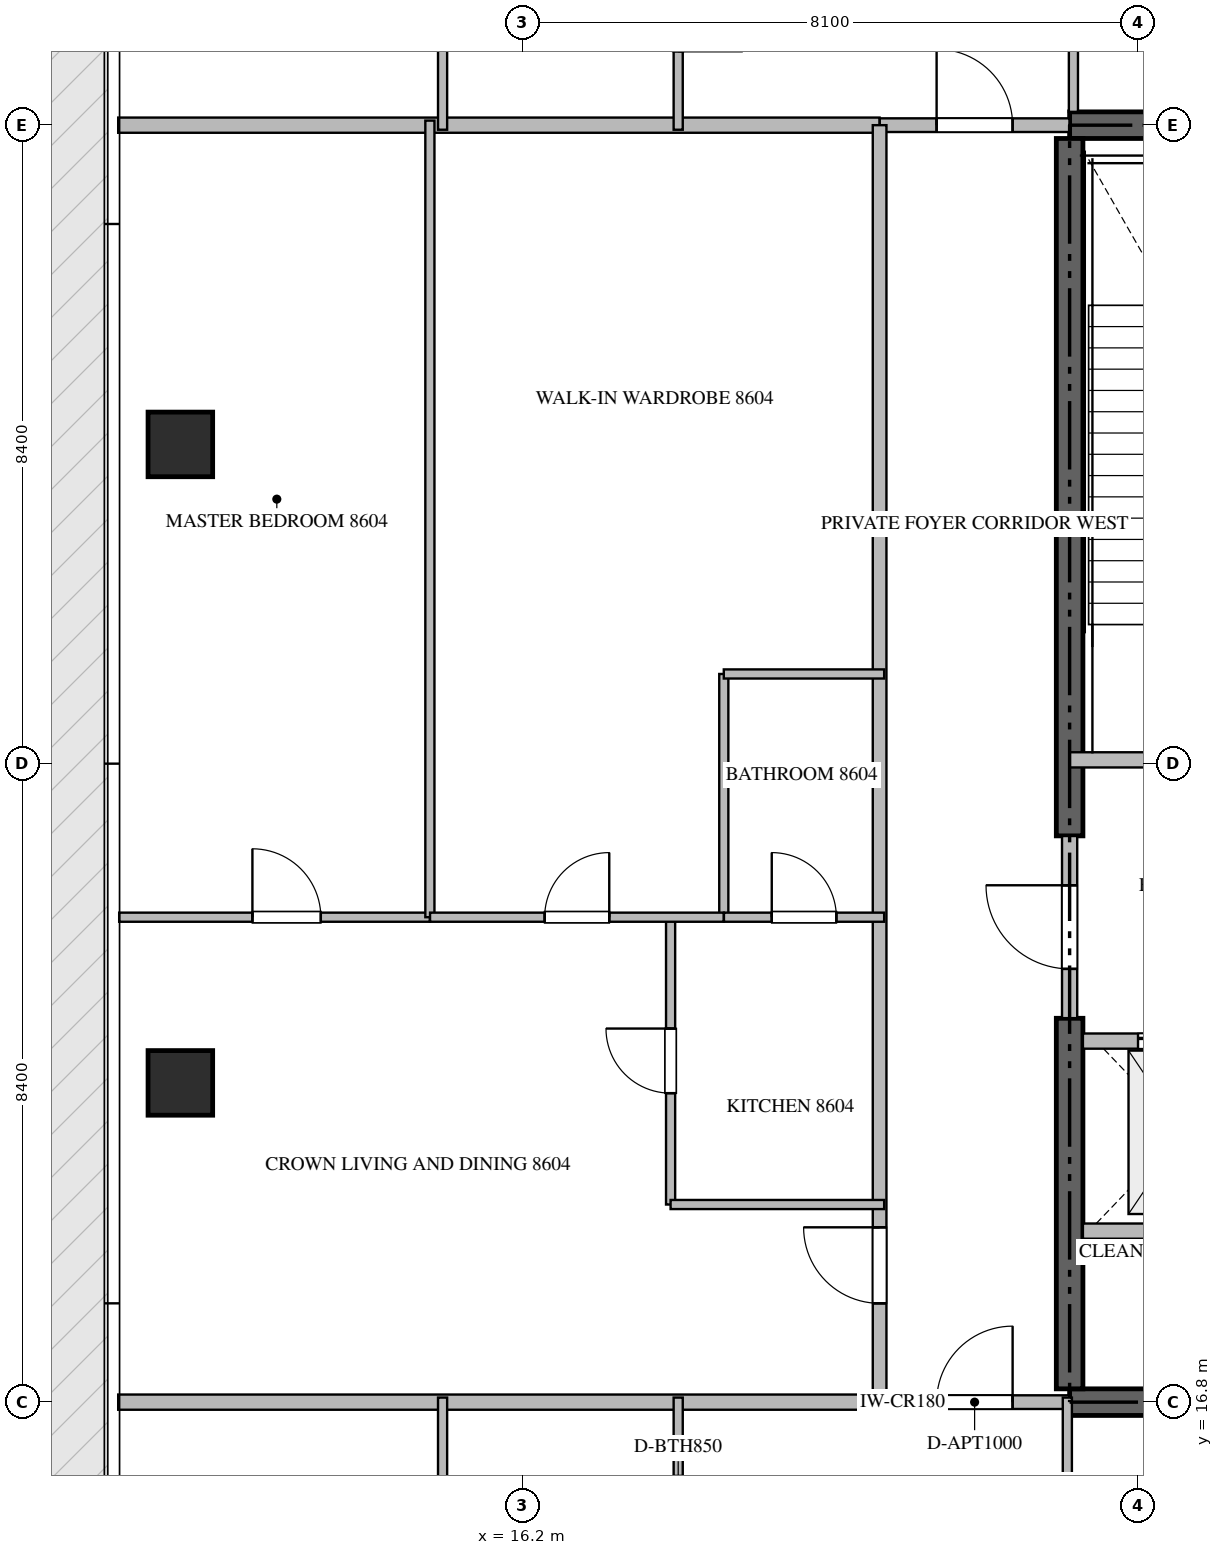
"""IFC4 building model, lengths in metres.
Left out: names, types, materials, properties, quantities, classifications, styles, units other than length and angle.
Written with IfcOpenShell. Run it as: python <this file> out.ifc"""

import sys

from ifc_helpers import new_model, si_unit, direction, frame, frame_2d, origin, origin_2d, place, context, subcontext, project, spatial, rectangle, extrude, source, transform, mapped, element, fill, save


model = new_model("IFC4")
c1 = context("Model", 3, precision=1e-05, world=origin(), true_north=direction((0.0, 1.0)))
c2 = subcontext(c1, "Body", "Model", "MODEL_VIEW")
j1 = project(units=[si_unit("LENGTHUNIT", "METRE"), si_unit("PLANEANGLEUNIT", "RADIAN")], contexts=[c1])
p1 = place(None, origin())
s1 = spatial("IfcSite", under=j1, at=p1, CompositionType="ELEMENT")
p2 = place(p1, origin())
s2 = spatial("IfcBuilding", under=s1, at=p2, CompositionType="ELEMENT")
p3 = place(p2, frame((0.0, 0.0, 347.95)))
s3 = spatial("IfcBuildingStorey", under=s2, at=p3, CompositionType="ELEMENT", Elevation=347.95)
for number, where, z_axis, x_axis in (
    (1, (23.4, 16.8, -0.26), (0.0, 0.0, 1.0), (1.0, 0.0, 0.0)),
    (2, (41.4, 33.6, -0.26), (0.0, 0.0, 1.0), (-1.0, 0.0, 0.0)),
):
    element("IfcWall", number, at=place(p3, frame(where, z_axis=z_axis, x_axis=x_axis)), inside=s3, PredefinedType="SHEAR", context=c2, shape_type="SweptSolid", body=[
        extrude(rectangle(XDim=18.0, YDim=0.35, at=frame_2d((9.0, 0.0))), origin(), (0.0, 0.0, 1.0), 5.898),
    ])
p4 = place(p3, frame((23.4, 16.975, -0.26), z_axis=(0.0, 0.0, 1.0), x_axis=(0.0, 1.0, 0.0)))
e3 = element("IfcWall", 3, at=p4, inside=s3, PredefinedType="SHEAR", context=c2, shape_type="SweptSolid", body=[
    extrude(rectangle(XDim=4.875, YDim=0.35, at=frame_2d((2.438, 0.0))), origin(), (0.0, 0.0, 1.0), 5.898),
])
p5 = place(p3, frame((23.4, 24.25, -0.26), z_axis=(0.0, 0.0, 1.0), x_axis=(0.0, 1.0, 0.0)))
e4 = element("IfcWall", 4, at=p5, inside=s3, PredefinedType="SHEAR", context=c2, shape_type="SweptSolid", body=[
    extrude(rectangle(XDim=9.175, YDim=0.35, at=frame_2d((4.587, 0.0))), origin(), (0.0, 0.0, 1.0), 5.898),
])
m1 = source(origin(), c2, "Body", "SweptSolid", [
    extrude(rectangle(XDim=0.85, YDim=0.85, at=origin_2d()), origin(), (0.0, 0.0, 1.0), 5.9),
])
for number, where, z_axis, x_axis in (
    (5, (11.7, 21.0, -0.26), (0.0, 0.0, 1.0), (1.0, 0.0, 0.0)),
    (6, (11.7, 29.4, -0.26), (0.0, 0.0, 1.0), (1.0, 0.0, 0.0)),
):
    element("IfcColumn", number, at=place(p3, frame(where, z_axis=z_axis, x_axis=x_axis)), inside=s3, PredefinedType="COLUMN", context=c2, shape_type="MappedRepresentation", body=[
        mapped(m1, transform((0.0, 0.0, 0.0), scale=1.0)),
    ])
p6 = place(p3, frame((23.4, 25.25, 0.0), z_axis=(0.0, 0.0, 1.0), x_axis=(1.0, 0.0, 0.0)))
e7 = element("IfcWall", 7, at=p6, inside=s3, PredefinedType="STANDARD", context=c2, shape_type="SweptSolid", body=[
    extrude(rectangle(XDim=4.45, YDim=0.2, at=frame_2d((2.225, 0.0))), origin(), (0.0, 0.0, 1.0), 5.64),
])
p7 = place(p6, frame((1.65, 0.0, 0.0)))
e8 = element("IfcOpeningElement", 8, at=p7, cuts=e7, PredefinedType="OPENING", context=c2, shape_type="SweptSolid", body=[
    extrude(rectangle(XDim=1.1, YDim=2.15, at=frame_2d((0.55, 1.075))), frame((0.0, 0.11, 0.0), z_axis=(0.0, -1.0, 0.0), x_axis=(1.0, 0.0, 0.0)), (0.0, 0.0, 1.0), 0.22),
])
p8 = place(p3, frame((23.575, 21.55, 0.0), z_axis=(0.0, 0.0, 1.0), x_axis=(1.0, 0.0, 0.0)))
e9 = element("IfcWall", 9, at=p8, inside=s3, PredefinedType="STANDARD", context=c2, shape_type="SweptSolid", body=[
    extrude(rectangle(XDim=2.475, YDim=0.2, at=frame_2d((1.238, 0.0))), origin(), (0.0, 0.0, 1.0), 5.64),
])
p9 = place(p8, frame((0.725, 0.0, 0.0)))
e10 = element("IfcOpeningElement", 10, at=p9, cuts=e9, PredefinedType="OPENING", context=c2, shape_type="SweptSolid", body=[
    extrude(rectangle(XDim=1.2, YDim=2.2, at=frame_2d((0.6, 1.1))), frame((0.0, 0.11, 0.0), z_axis=(0.0, -1.0, 0.0), x_axis=(1.0, 0.0, 0.0)), (0.0, 0.0, 1.0), 0.22),
])
p10 = place(p3, frame((23.575, 19.05, 0.0), z_axis=(0.0, 0.0, 1.0), x_axis=(1.0, 0.0, 0.0)))
e11 = element("IfcWall", 11, at=p10, inside=s3, PredefinedType="STANDARD", context=c2, shape_type="SweptSolid", body=[
    extrude(rectangle(XDim=2.475, YDim=0.2, at=frame_2d((1.238, 0.0))), origin(), (0.0, 0.0, 1.0), 5.64),
])
p11 = place(p3, frame((23.4, 21.852, 0.0), z_axis=(0.0, 0.0, 1.0), x_axis=(0.0, 1.0, 0.0)))
e12 = element("IfcWall", 12, at=p11, inside=s3, PredefinedType="STANDARD", context=c2, shape_type="SweptSolid", body=[
    extrude(rectangle(XDim=2.396, YDim=0.2, at=frame_2d((1.198, 0.0))), origin(), (0.0, 0.0, 1.0), 5.64),
])
p12 = place(p11, frame((0.648, 0.0, 0.0)))
e13 = element("IfcOpeningElement", 13, at=p12, cuts=e12, PredefinedType="OPENING", context=c2, shape_type="SweptSolid", body=[
    extrude(rectangle(XDim=1.1, YDim=2.15, at=frame_2d((0.55, 1.075))), frame((0.0, 0.11, 0.0), z_axis=(0.0, -1.0, 0.0), x_axis=(1.0, 0.0, 0.0)), (0.0, 0.0, 1.0), 0.22),
])
for number, where, z_axis, x_axis in (
    (14, (10.882, 16.8, 0.0), (0.0, 0.0, 1.0), (1.0, 0.0, 0.0)),
    (15, (10.882, 33.6, 0.0), (0.0, 0.0, 1.0), (1.0, 0.0, 0.0)),
):
    element("IfcWall", number, at=place(p3, frame(where, z_axis=z_axis, x_axis=x_axis)), inside=s3, PredefinedType="PARTITIONING", context=c2, shape_type="SweptSolid", body=[
        extrude(rectangle(XDim=10.018, YDim=0.2, at=frame_2d((5.009, 0.0))), origin(), (0.0, 0.0, 1.0), 5.64),
    ])
p13 = place(p3, frame((20.902, 16.8, 0.0), z_axis=(0.0, 0.0, 1.0), x_axis=(1.0, 0.0, 0.0)))
e16 = element("IfcWall", 16, at=p13, inside=s3, PredefinedType="PARTITIONING", context=c2, shape_type="SweptSolid", body=[
    extrude(rectangle(XDim=2.496, YDim=0.18, at=frame_2d((1.248, 0.0))), origin(), (0.0, 0.0, 1.0), 5.64),
])
p14 = place(p13, frame((0.748, 0.0, 0.0)))
e17 = element("IfcOpeningElement", 17, at=p14, cuts=e16, PredefinedType="OPENING", context=c2, shape_type="SweptSolid", body=[
    extrude(rectangle(XDim=1.0, YDim=2.15, at=frame_2d((0.5, 1.075))), frame((0.0, 0.1, 0.0), z_axis=(0.0, -1.0, 0.0), x_axis=(1.0, 0.0, 0.0)), (0.0, 0.0, 1.0), 0.2),
])
p15 = place(p3, frame((20.902, 33.6, 0.0), z_axis=(0.0, 0.0, 1.0), x_axis=(1.0, 0.0, 0.0)))
e18 = element("IfcWall", 18, at=p15, inside=s3, PredefinedType="PARTITIONING", context=c2, shape_type="SweptSolid", body=[
    extrude(rectangle(XDim=2.496, YDim=0.18, at=frame_2d((1.248, 0.0))), origin(), (0.0, 0.0, 1.0), 5.64),
])
p16 = place(p15, frame((0.748, 0.0, 0.0)))
e19 = element("IfcOpeningElement", 19, at=p16, cuts=e18, PredefinedType="OPENING", context=c2, shape_type="SweptSolid", body=[
    extrude(rectangle(XDim=1.0, YDim=2.15, at=frame_2d((0.5, 1.075))), frame((0.0, 0.1, 0.0), z_axis=(0.0, -1.0, 0.0), x_axis=(1.0, 0.0, 0.0)), (0.0, 0.0, 1.0), 0.2),
])
p17 = place(p3, frame((20.9, 16.8, 0.0), z_axis=(0.0, 0.0, 1.0), x_axis=(0.0, 1.0, 0.0)))
e20 = element("IfcWall", 20, at=p17, inside=s3, PredefinedType="PARTITIONING", context=c2, shape_type="SweptSolid", body=[
    extrude(rectangle(XDim=16.8, YDim=0.18, at=frame_2d((8.4, 0.0))), origin(), (0.0, 0.0, 1.0), 5.64),
])
p18 = place(p17, frame((1.3, 0.0, 0.0)))
e21 = element("IfcOpeningElement", 21, at=p18, cuts=e20, PredefinedType="OPENING", context=c2, shape_type="SweptSolid", body=[
    extrude(rectangle(XDim=1.0, YDim=2.15, at=frame_2d((0.5, 1.075))), frame((0.0, 0.1, 0.0), z_axis=(0.0, -1.0, 0.0), x_axis=(1.0, 0.0, 0.0)), (0.0, 0.0, 1.0), 0.2),
])
p19 = place(p3, frame((23.37, 14.05, 0.0), z_axis=(0.0, 0.0, 1.0), x_axis=(0.0, 1.0, 0.0)))
e22 = element("IfcWall", 22, at=p19, inside=s3, PredefinedType="PARTITIONING", context=c2, shape_type="SweptSolid", body=[
    extrude(rectangle(XDim=2.81, YDim=0.12, at=frame_2d((1.405, 0.0))), origin(), (0.0, 0.0, 1.0), 5.64),
])
p20 = place(p3, frame((15.15, 13.944, 0.0), z_axis=(0.0, 0.0, 1.0), x_axis=(0.0, 1.0, 0.0)))
e23 = element("IfcWall", 23, at=p20, inside=s3, PredefinedType="PARTITIONING", context=c2, shape_type="SweptSolid", body=[
    extrude(rectangle(XDim=2.916, YDim=0.12, at=frame_2d((1.458, 0.0))), origin(), (0.0, 0.0, 1.0), 5.64),
])
p21 = place(p3, frame((18.25, 13.946, 0.0), z_axis=(0.0, 0.0, 1.0), x_axis=(0.0, 1.0, 0.0)))
e24 = element("IfcWall", 24, at=p21, inside=s3, PredefinedType="PARTITIONING", context=c2, shape_type="SweptSolid", body=[
    extrude(rectangle(XDim=2.914, YDim=0.12, at=frame_2d((1.457, 0.0))), origin(), (0.0, 0.0, 1.0), 5.64),
])
p22 = place(p21, frame((1.032, 0.0, 0.0)))
e25 = element("IfcOpeningElement", 25, at=p22, cuts=e24, PredefinedType="OPENING", context=c2, shape_type="SweptSolid", body=[
    extrude(rectangle(XDim=0.85, YDim=2.1, at=frame_2d((0.425, 1.05))), frame((0.0, 0.07, 0.0), z_axis=(0.0, -1.0, 0.0), x_axis=(1.0, 0.0, 0.0)), (0.0, 0.0, 1.0), 0.14),
])
p23 = place(p3, frame((23.45, 36.35, 0.0), z_axis=(0.0, 0.0, 1.0), x_axis=(0.0, -1.0, 0.0)))
e26 = element("IfcWall", 26, at=p23, inside=s3, PredefinedType="PARTITIONING", context=c2, shape_type="SweptSolid", body=[
    extrude(rectangle(XDim=2.575, YDim=0.12, at=frame_2d((1.288, 0.0))), origin(), (0.0, 0.0, 1.0), 5.64),
])
p24 = place(p3, frame((15.15, 36.456, 0.0), z_axis=(0.0, 0.0, 1.0), x_axis=(0.0, -1.0, 0.0)))
e27 = element("IfcWall", 27, at=p24, inside=s3, PredefinedType="PARTITIONING", context=c2, shape_type="SweptSolid", body=[
    extrude(rectangle(XDim=2.916, YDim=0.12, at=frame_2d((1.458, 0.0))), origin(), (0.0, 0.0, 1.0), 5.64),
])
p25 = place(p3, frame((18.25, 36.454, 0.0), z_axis=(0.0, 0.0, 1.0), x_axis=(0.0, -1.0, 0.0)))
e28 = element("IfcWall", 28, at=p25, inside=s3, PredefinedType="PARTITIONING", context=c2, shape_type="SweptSolid", body=[
    extrude(rectangle(XDim=2.914, YDim=0.12, at=frame_2d((1.457, 0.0))), origin(), (0.0, 0.0, 1.0), 5.64),
])
p26 = place(p25, frame((1.032, 0.0, 0.0)))
e29 = element("IfcOpeningElement", 29, at=p26, cuts=e28, PredefinedType="OPENING", context=c2, shape_type="SweptSolid", body=[
    extrude(rectangle(XDim=0.85, YDim=2.1, at=frame_2d((0.425, 1.05))), frame((0.0, 0.07, 0.0), z_axis=(0.0, -1.0, 0.0), x_axis=(1.0, 0.0, 0.0)), (0.0, 0.0, 1.0), 0.14),
])
p27 = place(p3, frame((18.15, 19.4, 0.0), z_axis=(0.0, 0.0, 1.0), x_axis=(0.0, 1.0, 0.0)))
e30 = element("IfcWall", 30, at=p27, inside=s3, PredefinedType="PARTITIONING", context=c2, shape_type="SweptSolid", body=[
    extrude(rectangle(XDim=3.78, YDim=0.12, at=frame_2d((1.89, 0.0))), origin(), (0.0, 0.0, 1.0), 5.64),
])
p28 = place(p27, frame((1.465, 0.0, 0.0)))
e31 = element("IfcOpeningElement", 31, at=p28, cuts=e30, PredefinedType="OPENING", context=c2, shape_type="SweptSolid", body=[
    extrude(rectangle(XDim=0.85, YDim=2.1, at=frame_2d((0.425, 1.05))), frame((0.0, 0.07, 0.0), z_axis=(0.0, -1.0, 0.0), x_axis=(1.0, 0.0, 0.0)), (0.0, 0.0, 1.0), 0.14),
])
p29 = place(p3, frame((18.15, 19.4, 0.0), z_axis=(0.0, 0.0, 1.0), x_axis=(1.0, 0.0, 0.0)))
e32 = element("IfcWall", 32, at=p29, inside=s3, PredefinedType="PARTITIONING", context=c2, shape_type="SweptSolid", body=[
    extrude(rectangle(XDim=2.81, YDim=0.12, at=frame_2d((1.405, 0.0))), origin(), (0.0, 0.0, 1.0), 5.64),
])
p30 = place(p3, frame((10.895, 23.18, 0.0), z_axis=(0.0, 0.0, 1.0), x_axis=(1.0, 0.0, 0.0)))
e33 = element("IfcWall", 33, at=p30, inside=s3, PredefinedType="PARTITIONING", context=c2, shape_type="SweptSolid", body=[
    extrude(rectangle(XDim=4.088, YDim=0.12, at=frame_2d((2.044, 0.0))), origin(), (0.0, 0.0, 1.0), 5.64),
])
p31 = place(p30, frame((1.753, 0.0, 0.0)))
e34 = element("IfcOpeningElement", 34, at=p31, cuts=e33, PredefinedType="OPENING", context=c2, shape_type="SweptSolid", body=[
    extrude(rectangle(XDim=0.9, YDim=2.1, at=frame_2d((0.45, 1.05))), frame((0.0, 0.07, 0.0), z_axis=(0.0, -1.0, 0.0), x_axis=(1.0, 0.0, 0.0)), (0.0, 0.0, 1.0), 0.14),
])
p32 = place(p3, frame((14.983, 23.18, 0.0), z_axis=(0.0, 0.0, 1.0), x_axis=(0.0, 1.0, 0.0)))
e35 = element("IfcWall", 35, at=p32, inside=s3, PredefinedType="PARTITIONING", context=c2, shape_type="SweptSolid", body=[
    extrude(rectangle(XDim=10.48, YDim=0.12, at=frame_2d((5.24, 0.0))), origin(), (0.0, 0.0, 1.0), 5.64),
])
p33 = place(p3, frame((18.85, 23.18, 0.0), z_axis=(0.0, 0.0, 1.0), x_axis=(0.0, 1.0, 0.0)))
e36 = element("IfcWall", 36, at=p33, inside=s3, PredefinedType="PARTITIONING", context=c2, shape_type="SweptSolid", body=[
    extrude(rectangle(XDim=3.2, YDim=0.12, at=frame_2d((1.6, 0.0))), origin(), (0.0, 0.0, 1.0), 5.64),
])
p34 = place(p3, frame((18.85, 26.38, 0.0), z_axis=(0.0, 0.0, 1.0), x_axis=(1.0, 0.0, 0.0)))
e37 = element("IfcWall", 37, at=p34, inside=s3, PredefinedType="PARTITIONING", context=c2, shape_type="SweptSolid", body=[
    extrude(rectangle(XDim=2.11, YDim=0.12, at=frame_2d((1.055, 0.0))), origin(), (0.0, 0.0, 1.0), 5.64),
])
p35 = place(p3, frame((14.985, 23.18, 0.0), z_axis=(0.0, 0.0, 1.0), x_axis=(1.0, 0.0, 0.0)))
e38 = element("IfcWall", 38, at=p35, inside=s3, PredefinedType="PARTITIONING", context=c2, shape_type="SweptSolid", body=[
    extrude(rectangle(XDim=3.865, YDim=0.12, at=frame_2d((1.933, 0.0))), origin(), (0.0, 0.0, 1.0), 5.64),
])
p36 = place(p35, frame((1.508, 0.0, 0.0)))
e39 = element("IfcOpeningElement", 39, at=p36, cuts=e38, PredefinedType="OPENING", context=c2, shape_type="SweptSolid", body=[
    extrude(rectangle(XDim=0.85, YDim=2.1, at=frame_2d((0.425, 1.05))), frame((0.0, 0.07, 0.0), z_axis=(0.0, -1.0, 0.0), x_axis=(1.0, 0.0, 0.0)), (0.0, 0.0, 1.0), 0.14),
])
p37 = place(p3, frame((18.852, 23.18, 0.0), z_axis=(0.0, 0.0, 1.0), x_axis=(1.0, 0.0, 0.0)))
e40 = element("IfcWall", 40, at=p37, inside=s3, PredefinedType="PARTITIONING", context=c2, shape_type="SweptSolid", body=[
    extrude(rectangle(XDim=2.108, YDim=0.12, at=frame_2d((1.054, 0.0))), origin(), (0.0, 0.0, 1.0), 5.64),
])
p38 = place(p37, frame((0.629, 0.0, 0.0)))
e41 = element("IfcOpeningElement", 41, at=p38, cuts=e40, PredefinedType="OPENING", context=c2, shape_type="SweptSolid", body=[
    extrude(rectangle(XDim=0.85, YDim=2.1, at=frame_2d((0.425, 1.05))), frame((0.0, 0.07, 0.0), z_axis=(0.0, -1.0, 0.0), x_axis=(1.0, 0.0, 0.0)), (0.0, 0.0, 1.0), 0.14),
])
m2 = source(origin(), c2, "Body", "SweptSolid", [
    extrude(rectangle(XDim=1.2, YDim=2.2, at=frame_2d((0.6, 1.1))), frame((0.0, 0.025, 0.0), z_axis=(0.0, -1.0, 0.0), x_axis=(1.0, 0.0, 0.0)), (0.0, 0.0, 1.0), 0.05),
])
p39 = place(p9, origin())
e42 = element("IfcDoor", 42, at=p39, inside=s3, OperationType="DOUBLE_DOOR_SLIDING", PredefinedType="DOOR", context=c2, shape_type="MappedRepresentation", body=[
    mapped(m2, transform((0.0, 0.0, 0.0), scale=1.0)),
])
fill(e10, e42)
m3 = source(origin(), c2, "Body", "SweptSolid", [
    extrude(rectangle(XDim=1.1, YDim=2.15, at=frame_2d((0.55, 1.075))), frame((0.0, 0.025, 0.0), z_axis=(0.0, -1.0, 0.0), x_axis=(1.0, 0.0, 0.0)), (0.0, 0.0, 1.0), 0.05),
])
p40 = place(p12, origin())
e43 = element("IfcDoor", 43, at=p40, inside=s3, OperationType="SINGLE_SWING_RIGHT", PredefinedType="DOOR", context=c2, shape_type="MappedRepresentation", body=[
    mapped(m3, transform((0.0, 0.0, 0.0), scale=1.0)),
])
fill(e13, e43)
m4 = source(origin(), c2, "Body", "SweptSolid", [
    extrude(rectangle(XDim=1.0, YDim=2.15, at=frame_2d((0.5, 1.075))), frame((0.0, 0.025, 0.0), z_axis=(0.0, -1.0, 0.0), x_axis=(1.0, 0.0, 0.0)), (0.0, 0.0, 1.0), 0.05),
])
p41 = place(p14, origin())
e44 = element("IfcDoor", 44, at=p41, inside=s3, OperationType="SINGLE_SWING_RIGHT", PredefinedType="DOOR", context=c2, shape_type="MappedRepresentation", body=[
    mapped(m4, transform((0.0, 0.0, 0.0), scale=1.0)),
])
fill(e17, e44)
p42 = place(p16, origin())
e45 = element("IfcDoor", 45, at=p42, inside=s3, OperationType="SINGLE_SWING_LEFT", PredefinedType="DOOR", context=c2, shape_type="MappedRepresentation", body=[
    mapped(m4, transform((0.0, 0.0, 0.0), scale=1.0)),
])
fill(e19, e45)
p43 = place(p18, origin())
e46 = element("IfcDoor", 46, at=p43, inside=s3, OperationType="SINGLE_SWING_RIGHT", PredefinedType="DOOR", context=c2, shape_type="MappedRepresentation", body=[
    mapped(m4, transform((0.0, 0.0, 0.0), scale=1.0)),
])
fill(e21, e46)
m5 = source(origin(), c2, "Body", "SweptSolid", [
    extrude(rectangle(XDim=0.85, YDim=2.1, at=frame_2d((0.425, 1.05))), frame((0.0, 0.025, 0.0), z_axis=(0.0, -1.0, 0.0), x_axis=(1.0, 0.0, 0.0)), (0.0, 0.0, 1.0), 0.05),
])
p44 = place(p28, origin())
e47 = element("IfcDoor", 47, at=p44, inside=s3, OperationType="SINGLE_SWING_RIGHT", PredefinedType="DOOR", context=c2, shape_type="MappedRepresentation", body=[
    mapped(m5, transform((0.0, 0.0, 0.0), scale=1.0)),
])
fill(e31, e47)
m6 = source(origin(), c2, "Body", "SweptSolid", [
    extrude(rectangle(XDim=0.9, YDim=2.1, at=frame_2d((0.45, 1.05))), frame((0.0, 0.025, 0.0), z_axis=(0.0, -1.0, 0.0), x_axis=(1.0, 0.0, 0.0)), (0.0, 0.0, 1.0), 0.05),
])
p45 = place(p31, origin())
e48 = element("IfcDoor", 48, at=p45, inside=s3, OperationType="SINGLE_SWING_LEFT", PredefinedType="DOOR", context=c2, shape_type="MappedRepresentation", body=[
    mapped(m6, transform((0.0, 0.0, 0.0), scale=1.0)),
])
fill(e34, e48)
p46 = place(p36, origin())
e49 = element("IfcDoor", 49, at=p46, inside=s3, OperationType="SINGLE_SWING_RIGHT", PredefinedType="DOOR", context=c2, shape_type="MappedRepresentation", body=[
    mapped(m5, transform((0.0, 0.0, 0.0), scale=1.0)),
])
fill(e39, e49)
p47 = place(p38, origin())
e50 = element("IfcDoor", 50, at=p47, inside=s3, OperationType="SINGLE_SWING_LEFT", PredefinedType="DOOR", context=c2, shape_type="MappedRepresentation", body=[
    mapped(m5, transform((0.0, 0.0, 0.0), scale=1.0)),
])
fill(e41, e50)
save(model, sys.argv[1])
